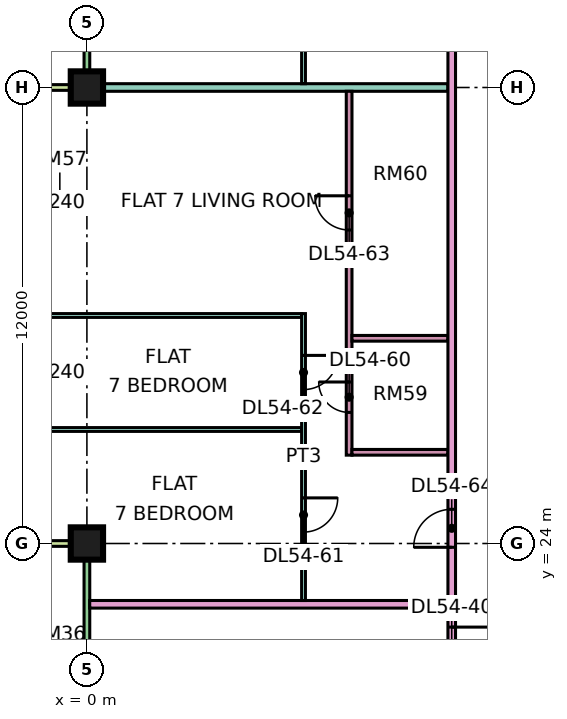
"""IFC4 building model, lengths in metres.
Left out: names, types, materials, properties, quantities, classifications, styles, units other than length and angle.
Written with IfcOpenShell. Run it as: python <this file> out.ifc"""

import sys

from ifc_helpers import new_model, si_unit, direction, frame, frame_2d, origin, origin_2d, place, context, subcontext, project, spatial, rectangle, extrude, element, fill, save


model = new_model("IFC4")
c1 = context("Model", 3, precision=1e-05, world=origin(), true_north=direction((0.0, 1.0)))
c2 = subcontext(c1, "Body", "Model", "MODEL_VIEW")
j1 = project(units=[si_unit("LENGTHUNIT", "METRE"), si_unit("PLANEANGLEUNIT", "RADIAN")], contexts=[c1])
p1 = place(None, origin())
s1 = spatial("IfcSite", under=j1, at=p1, CompositionType="ELEMENT")
p2 = place(p1, origin())
s2 = spatial("IfcBuilding", under=s1, at=p2, CompositionType="ELEMENT")
p3 = place(p2, frame((0.0, 0.0, 230.4)))
s3 = spatial("IfcBuildingStorey", under=s2, at=p3, CompositionType="ELEMENT", Elevation=230.4)
p4 = place(p3, frame((0.0, 24.0, 0.0), z_axis=(0.0, 0.0, 1.0), x_axis=(1.0, 0.0, 0.0)))
e1 = element("IfcColumn", 1, at=p4, inside=s3, PredefinedType="COLUMN", context=c2, shape_type="SweptSolid", body=[
    extrude(rectangle(XDim=0.85, YDim=0.85, at=origin_2d()), origin(), (0.0, 0.0, 1.0), 3.75),
])
p5 = place(p3, frame((0.0, 36.0, 0.0), z_axis=(0.0, 0.0, 1.0), x_axis=(1.0, 0.0, 0.0)))
e2 = element("IfcColumn", 2, at=p5, inside=s3, PredefinedType="COLUMN", context=c2, shape_type="SweptSolid", body=[
    extrude(rectangle(XDim=0.85, YDim=0.85, at=origin_2d()), origin(), (0.0, 0.0, 1.0), 3.75),
])
p6 = place(p3, frame((0.0, 47.925, 0.0), z_axis=(0.0, 0.0, 1.0), x_axis=(0.0, -1.0, 0.0)))
e3 = element("IfcWall", 3, at=p6, inside=s3, PredefinedType="SOLIDWALL", context=c2, shape_type="SweptSolid", body=[
    extrude(rectangle(XDim=11.85, YDim=0.15, at=frame_2d((5.925, 0.0))), origin(), (0.0, 0.0, 1.0), 3.35),
])
p7 = place(p6, frame((0.6, 0.0, 0.45)))
e4 = element("IfcOpeningElement", 4, at=p7, cuts=e3, PredefinedType="OPENING", context=c2, shape_type="SweptSolid", body=[
    extrude(rectangle(XDim=1.2, YDim=2.4, at=frame_2d((0.6, 1.2))), frame((0.0, 0.085, 0.0), z_axis=(0.0, -1.0, 0.0), x_axis=(1.0, 0.0, 0.0)), (0.0, 0.0, 1.0), 0.17),
])
p8 = place(p6, frame((4.087, 0.0, 0.0)))
e5 = element("IfcOpeningElement", 5, at=p8, cuts=e3, PredefinedType="OPENING", context=c2, shape_type="SweptSolid", body=[
    extrude(rectangle(XDim=1.2, YDim=2.4, at=frame_2d((0.6, 1.2))), frame((0.0, 0.085, 0.0), z_axis=(0.0, -1.0, 0.0), x_axis=(1.0, 0.0, 0.0)), (0.0, 0.0, 1.0), 0.17),
])
p9 = place(p6, frame((6.525, 0.0, 0.45)))
e6 = element("IfcOpeningElement", 6, at=p9, cuts=e3, PredefinedType="OPENING", context=c2, shape_type="SweptSolid", body=[
    extrude(rectangle(XDim=1.8, YDim=2.4, at=frame_2d((0.9, 1.2))), frame((0.0, 0.085, 0.0), z_axis=(0.0, -1.0, 0.0), x_axis=(1.0, 0.0, 0.0)), (0.0, 0.0, 1.0), 0.17),
])
p10 = place(p6, frame((9.562, 0.0, 0.45)))
e7 = element("IfcOpeningElement", 7, at=p10, cuts=e3, PredefinedType="OPENING", context=c2, shape_type="SweptSolid", body=[
    extrude(rectangle(XDim=1.2, YDim=2.4, at=frame_2d((0.6, 1.2))), frame((0.0, 0.085, 0.0), z_axis=(0.0, -1.0, 0.0), x_axis=(1.0, 0.0, 0.0)), (0.0, 0.0, 1.0), 0.17),
])
p11 = place(p3, frame((-1.5, 36.0, 0.0), z_axis=(0.0, 0.0, 1.0), x_axis=(1.0, 0.0, 0.0)))
e8 = element("IfcWall", 8, at=p11, inside=s3, PredefinedType="SOLIDWALL", context=c2, shape_type="SweptSolid", body=[
    extrude(rectangle(XDim=1.5, YDim=0.15, at=frame_2d((0.75, 0.0))), origin(), (0.0, 0.0, 1.0), 3.35),
])
p12 = place(p3, frame((0.0, 23.925, 0.0), z_axis=(0.0, 0.0, 1.0), x_axis=(0.0, -1.0, 0.0)))
e9 = element("IfcWall", 9, at=p12, inside=s3, PredefinedType="SOLIDWALL", context=c2, shape_type="SweptSolid", body=[
    extrude(rectangle(XDim=11.35, YDim=0.15, at=frame_2d((5.675, 0.0))), origin(), (0.0, 0.0, 1.0), 3.35),
])
p13 = place(p12, frame((6.738, 0.0, 0.0)))
e10 = element("IfcOpeningElement", 10, at=p13, cuts=e9, PredefinedType="OPENING", context=c2, shape_type="SweptSolid", body=[
    extrude(rectangle(XDim=1.8, YDim=2.4, at=frame_2d((0.9, 1.2))), frame((0.0, 0.085, 0.0), z_axis=(0.0, -1.0, 0.0), x_axis=(1.0, 0.0, 0.0)), (0.0, 0.0, 1.0), 0.17),
])
p14 = place(p3, frame((-1.5, 24.0, 0.0), z_axis=(0.0, 0.0, 1.0), x_axis=(1.0, 0.0, 0.0)))
e11 = element("IfcWall", 11, at=p14, inside=s3, PredefinedType="SOLIDWALL", context=c2, shape_type="SweptSolid", body=[
    extrude(rectangle(XDim=1.5, YDim=0.15, at=frame_2d((0.75, 0.0))), origin(), (0.0, 0.0, 1.0), 3.35),
])
p15 = place(p3, frame((-1.351, 27.0, 0.0), z_axis=(0.0, 0.0, 1.0), x_axis=(1.0, 0.0, 0.0)))
e12 = element("IfcWall", 12, at=p15, inside=s3, PredefinedType="PARTITIONING", context=c2, shape_type="SweptSolid", body=[
    extrude(rectangle(XDim=7.001, YDim=0.1, at=frame_2d((3.5, 0.0))), origin(), (0.0, 0.0, 1.0), 3.35),
])
p16 = place(p3, frame((-1.35, 30.0, 0.0), z_axis=(0.0, 0.0, 1.0), x_axis=(1.0, 0.0, 0.0)))
e13 = element("IfcWall", 13, at=p16, inside=s3, PredefinedType="PARTITIONING", context=c2, shape_type="SweptSolid", body=[
    extrude(rectangle(XDim=7.0, YDim=0.1, at=frame_2d((3.5, 0.0))), origin(), (0.0, 0.0, 1.0), 3.35),
])
e14 = element("IfcWall", 14, at=p5, inside=s3, PredefinedType="PARTITIONING", context=c2, shape_type="SweptSolid", body=[
    extrude(rectangle(XDim=9.5, YDim=0.2, at=frame_2d((4.75, 0.0))), origin(), (0.0, 0.0, 1.0), 3.35),
])
p17 = place(p3, frame((0.074, 22.4, 0.0), z_axis=(0.0, 0.0, 1.0), x_axis=(1.0, 0.0, 0.0)))
e15 = element("IfcWall", 15, at=p17, inside=s3, PredefinedType="PARTITIONING", context=c2, shape_type="SweptSolid", body=[
    extrude(rectangle(XDim=9.426, YDim=0.2, at=frame_2d((4.713, 0.0))), origin(), (0.0, 0.0, 1.0), 3.35),
])
p18 = place(p3, frame((5.7, 22.5, 0.0), z_axis=(0.0, 0.0, 1.0), x_axis=(0.0, 1.0, 0.0)))
e16 = element("IfcWall", 16, at=p18, inside=s3, PredefinedType="PARTITIONING", context=c2, shape_type="SweptSolid", body=[
    extrude(rectangle(XDim=7.55, YDim=0.1, at=frame_2d((3.775, 0.0))), origin(), (0.0, 0.0, 1.0), 3.35),
])
p19 = place(p18, frame((1.8, 0.0, 0.0)))
e17 = element("IfcOpeningElement", 17, at=p19, cuts=e16, PredefinedType="OPENING", context=c2, shape_type="SweptSolid", body=[
    extrude(rectangle(XDim=0.9, YDim=2.1, at=frame_2d((0.45, 1.05))), frame((0.0, 0.06, 0.0), z_axis=(0.0, -1.0, 0.0), x_axis=(1.0, 0.0, 0.0)), (0.0, 0.0, 1.0), 0.12),
])
p20 = place(p18, frame((5.55, 0.0, 0.0)))
e18 = element("IfcOpeningElement", 18, at=p20, cuts=e16, PredefinedType="OPENING", context=c2, shape_type="SweptSolid", body=[
    extrude(rectangle(XDim=0.9, YDim=2.1, at=frame_2d((0.45, 1.05))), frame((0.0, 0.06, 0.0), z_axis=(0.0, -1.0, 0.0), x_axis=(1.0, 0.0, 0.0)), (0.0, 0.0, 1.0), 0.12),
])
p21 = place(p3, frame((5.7, 36.1, 0.0), z_axis=(0.0, 0.0, 1.0), x_axis=(0.0, 1.0, 0.0)))
e19 = element("IfcWall", 19, at=p21, inside=s3, PredefinedType="PARTITIONING", context=c2, shape_type="SweptSolid", body=[
    extrude(rectangle(XDim=28.25, YDim=0.1, at=frame_2d((14.125, 0.0))), origin(), (0.0, 0.0, 1.0), 3.35),
])
p22 = place(p21, frame((0.95, 0.0, 0.0)))
e20 = element("IfcOpeningElement", 20, at=p22, cuts=e19, PredefinedType="OPENING", context=c2, shape_type="SweptSolid", body=[
    extrude(rectangle(XDim=0.9, YDim=2.1, at=frame_2d((0.45, 1.05))), frame((0.0, 0.06, 0.0), z_axis=(0.0, -1.0, 0.0), x_axis=(1.0, 0.0, 0.0)), (0.0, 0.0, 1.0), 0.12),
])
p23 = place(p21, frame((3.95, 0.0, 0.0)))
e21 = element("IfcOpeningElement", 21, at=p23, cuts=e19, PredefinedType="OPENING", context=c2, shape_type="SweptSolid", body=[
    extrude(rectangle(XDim=0.9, YDim=2.1, at=frame_2d((0.45, 1.05))), frame((0.0, 0.06, 0.0), z_axis=(0.0, -1.0, 0.0), x_axis=(1.0, 0.0, 0.0)), (0.0, 0.0, 1.0), 0.12),
])
p24 = place(p21, frame((6.95, 0.0, 0.0)))
e22 = element("IfcOpeningElement", 22, at=p24, cuts=e19, PredefinedType="OPENING", context=c2, shape_type="SweptSolid", body=[
    extrude(rectangle(XDim=0.9, YDim=2.1, at=frame_2d((0.45, 1.05))), frame((0.0, 0.06, 0.0), z_axis=(0.0, -1.0, 0.0), x_axis=(1.0, 0.0, 0.0)), (0.0, 0.0, 1.0), 0.12),
])
p25 = place(p21, frame((18.95, 0.0, 0.0)))
e23 = element("IfcOpeningElement", 23, at=p25, cuts=e19, PredefinedType="OPENING", context=c2, shape_type="SweptSolid", body=[
    extrude(rectangle(XDim=0.9, YDim=2.1, at=frame_2d((0.45, 1.05))), frame((0.0, 0.06, 0.0), z_axis=(0.0, -1.0, 0.0), x_axis=(1.0, 0.0, 0.0)), (0.0, 0.0, 1.0), 0.12),
])
p26 = place(p21, frame((21.95, 0.0, 0.0)))
e24 = element("IfcOpeningElement", 24, at=p26, cuts=e19, PredefinedType="OPENING", context=c2, shape_type="SweptSolid", body=[
    extrude(rectangle(XDim=0.9, YDim=2.1, at=frame_2d((0.45, 1.05))), frame((0.0, 0.06, 0.0), z_axis=(0.0, -1.0, 0.0), x_axis=(1.0, 0.0, 0.0)), (0.0, 0.0, 1.0), 0.12),
])
p27 = place(p21, frame((24.95, 0.0, 0.0)))
e25 = element("IfcOpeningElement", 25, at=p27, cuts=e19, PredefinedType="OPENING", context=c2, shape_type="SweptSolid", body=[
    extrude(rectangle(XDim=0.9, YDim=2.1, at=frame_2d((0.45, 1.05))), frame((0.0, 0.06, 0.0), z_axis=(0.0, -1.0, 0.0), x_axis=(1.0, 0.0, 0.0)), (0.0, 0.0, 1.0), 0.12),
])
p28 = place(p21, frame((12.95, 0.0, 0.0)))
e26 = element("IfcOpeningElement", 26, at=p28, cuts=e19, PredefinedType="OPENING", context=c2, shape_type="SweptSolid", body=[
    extrude(rectangle(XDim=0.9, YDim=2.1, at=frame_2d((0.45, 1.05))), frame((0.0, 0.06, 0.0), z_axis=(0.0, -1.0, 0.0), x_axis=(1.0, 0.0, 0.0)), (0.0, 0.0, 1.0), 0.12),
])
p29 = place(p3, frame((6.9, 26.325, 0.0), z_axis=(0.0, 0.0, 1.0), x_axis=(0.0, 1.0, 0.0)))
e27 = element("IfcWall", 27, at=p29, inside=s3, PredefinedType="PARTITIONING", context=c2, shape_type="SweptSolid", body=[
    extrude(rectangle(XDim=9.575, YDim=0.15, at=frame_2d((4.788, 0.0))), origin(), (0.0, 0.0, 1.0), 3.35),
])
p30 = place(p29, frame((1.125, 0.0, 0.0)))
e28 = element("IfcOpeningElement", 28, at=p30, cuts=e27, PredefinedType="OPENING", context=c2, shape_type="SweptSolid", body=[
    extrude(rectangle(XDim=0.8, YDim=2.1, at=frame_2d((0.4, 1.05))), frame((0.0, 0.085, 0.0), z_axis=(0.0, -1.0, 0.0), x_axis=(1.0, 0.0, 0.0)), (0.0, 0.0, 1.0), 0.17),
])
p31 = place(p29, frame((5.925, 0.0, 0.0)))
e29 = element("IfcOpeningElement", 29, at=p31, cuts=e27, PredefinedType="OPENING", context=c2, shape_type="SweptSolid", body=[
    extrude(rectangle(XDim=0.9, YDim=2.1, at=frame_2d((0.45, 1.05))), frame((0.0, 0.085, 0.0), z_axis=(0.0, -1.0, 0.0), x_axis=(1.0, 0.0, 0.0)), (0.0, 0.0, 1.0), 0.17),
])
for number, where, z_axis, x_axis in (
    (30, (6.975, 26.4, 0.0), (0.0, 0.0, 1.0), (1.0, 0.0, 0.0)),
    (31, (6.975, 29.4, 0.0), (0.0, 0.0, 1.0), (1.0, 0.0, 0.0)),
):
    element("IfcWall", number, at=place(p3, frame(where, z_axis=z_axis, x_axis=x_axis)), inside=s3, PredefinedType="PARTITIONING", context=c2, shape_type="SweptSolid", body=[
        extrude(rectangle(XDim=2.525, YDim=0.15, at=frame_2d((1.262, 0.0))), origin(), (0.0, 0.0, 1.0), 3.35),
    ])
p32 = place(p3, frame((9.6, 20.0, 0.0), z_axis=(0.0, 0.0, 1.0), x_axis=(0.0, 1.0, 0.0)))
e32 = element("IfcWall", 32, at=p32, inside=s3, PredefinedType="PARTITIONING", context=c2, shape_type="SweptSolid", body=[
    extrude(rectangle(XDim=44.35, YDim=0.2, at=frame_2d((22.175, 0.0))), origin(), (0.0, 0.0, 1.0), 3.35),
])
p33 = place(p32, frame((17.1, 0.0, 0.0)))
e33 = element("IfcOpeningElement", 33, at=p33, cuts=e32, PredefinedType="OPENING", context=c2, shape_type="SweptSolid", body=[
    extrude(rectangle(XDim=1.0, YDim=2.1, at=frame_2d((0.5, 1.05))), frame((0.0, 0.11, 0.0), z_axis=(0.0, -1.0, 0.0), x_axis=(1.0, 0.0, 0.0)), (0.0, 0.0, 1.0), 0.22),
])
p34 = place(p32, frame((0.6, 0.0, 0.0)))
e34 = element("IfcOpeningElement", 34, at=p34, cuts=e32, PredefinedType="OPENING", context=c2, shape_type="SweptSolid", body=[
    extrude(rectangle(XDim=1.2, YDim=2.1, at=frame_2d((0.6, 1.05))), frame((0.0, 0.11, 0.0), z_axis=(0.0, -1.0, 0.0), x_axis=(1.0, 0.0, 0.0)), (0.0, 0.0, 1.0), 0.22),
])
p35 = place(p32, frame((3.9, 0.0, 0.0)))
e35 = element("IfcOpeningElement", 35, at=p35, cuts=e32, PredefinedType="OPENING", context=c2, shape_type="SweptSolid", body=[
    extrude(rectangle(XDim=1.0, YDim=2.1, at=frame_2d((0.5, 1.05))), frame((0.0, 0.11, 0.0), z_axis=(0.0, -1.0, 0.0), x_axis=(1.0, 0.0, 0.0)), (0.0, 0.0, 1.0), 0.22),
])
p36 = place(p34, origin())
e36 = element("IfcDoor", 36, at=p36, inside=s3, OperationType="SINGLE_SWING_RIGHT", PredefinedType="DOOR", context=c2, shape_type="SweptSolid", body=[
    extrude(rectangle(XDim=1.2, YDim=2.1, at=frame_2d((0.6, 1.05))), frame((0.0, 0.025, 0.0), z_axis=(0.0, -1.0, 0.0), x_axis=(1.0, 0.0, 0.0)), (0.0, 0.0, 1.0), 0.05),
])
fill(e34, e36)
p37 = place(p30, frame((0.8, 0.0, 0.0), z_axis=(0.0, 0.0, 1.0), x_axis=(-1.0, 0.0, 0.0)))
e37 = element("IfcDoor", 37, at=p37, inside=s3, OperationType="SINGLE_SWING_RIGHT", PredefinedType="DOOR", context=c2, shape_type="SweptSolid", body=[
    extrude(rectangle(XDim=0.8, YDim=2.1, at=frame_2d((0.4, 1.05))), frame((0.0, 0.025, 0.0), z_axis=(0.0, -1.0, 0.0), x_axis=(1.0, 0.0, 0.0)), (0.0, 0.0, 1.0), 0.05),
])
fill(e28, e37)
p38 = place(p19, origin())
e38 = element("IfcDoor", 38, at=p38, inside=s3, OperationType="SINGLE_SWING_RIGHT", PredefinedType="DOOR", context=c2, shape_type="SweptSolid", body=[
    extrude(rectangle(XDim=0.9, YDim=2.1, at=frame_2d((0.45, 1.05))), frame((0.0, 0.025, 0.0), z_axis=(0.0, -1.0, 0.0), x_axis=(1.0, 0.0, 0.0)), (0.0, 0.0, 1.0), 0.05),
])
fill(e17, e38)
p39 = place(p20, origin())
e39 = element("IfcDoor", 39, at=p39, inside=s3, OperationType="SINGLE_SWING_RIGHT", PredefinedType="DOOR", context=c2, shape_type="SweptSolid", body=[
    extrude(rectangle(XDim=0.9, YDim=2.1, at=frame_2d((0.45, 1.05))), frame((0.0, 0.025, 0.0), z_axis=(0.0, -1.0, 0.0), x_axis=(1.0, 0.0, 0.0)), (0.0, 0.0, 1.0), 0.05),
])
fill(e18, e39)
p40 = place(p31, frame((0.9, 0.0, 0.0), z_axis=(0.0, 0.0, 1.0), x_axis=(-1.0, 0.0, 0.0)))
e40 = element("IfcDoor", 40, at=p40, inside=s3, OperationType="SINGLE_SWING_RIGHT", PredefinedType="DOOR", context=c2, shape_type="SweptSolid", body=[
    extrude(rectangle(XDim=0.9, YDim=2.1, at=frame_2d((0.45, 1.05))), frame((0.0, 0.025, 0.0), z_axis=(0.0, -1.0, 0.0), x_axis=(1.0, 0.0, 0.0)), (0.0, 0.0, 1.0), 0.05),
])
fill(e29, e40)
p41 = place(p35, origin())
e41 = element("IfcDoor", 41, at=p41, inside=s3, OperationType="SINGLE_SWING_LEFT", PredefinedType="DOOR", context=c2, shape_type="SweptSolid", body=[
    extrude(rectangle(XDim=1.0, YDim=2.1, at=frame_2d((0.5, 1.05))), frame((0.0, 0.025, 0.0), z_axis=(0.0, -1.0, 0.0), x_axis=(1.0, 0.0, 0.0)), (0.0, 0.0, 1.0), 0.05),
])
fill(e35, e41)
save(model, sys.argv[1])
